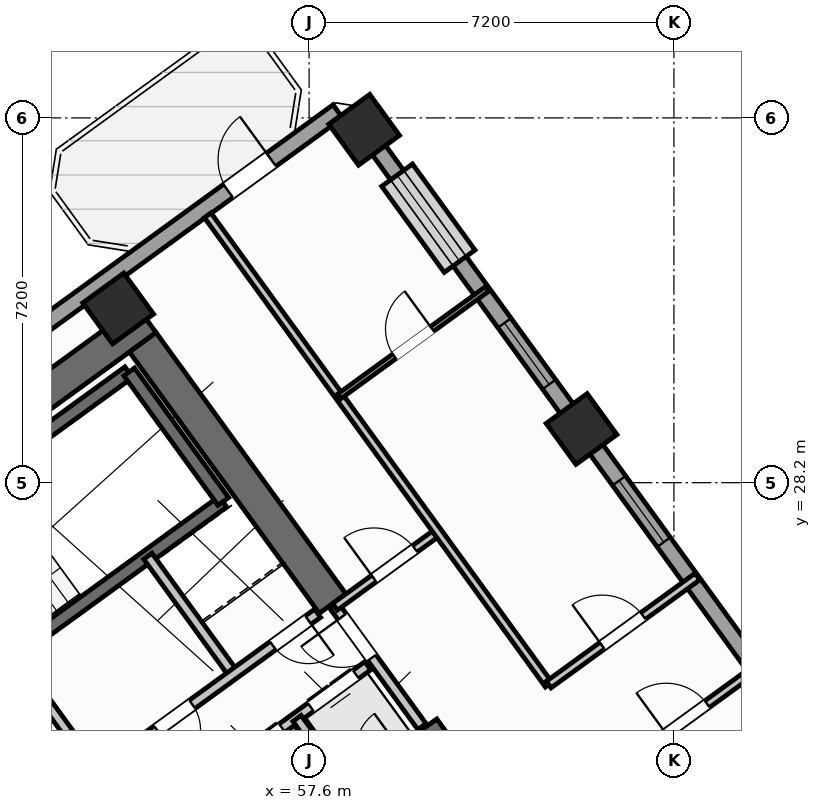
"""IFC4 building model, lengths in metres.
Left out: names, types, materials, properties, quantities, classifications, styles, units other than length and angle.
Written with IfcOpenShell. Run it as: python <this file> out.ifc"""

import sys

from ifc_helpers import new_model, si_unit, direction, frame, frame_2d, origin, origin_2d, place, context, subcontext, project, spatial, rectangle, hollow_rectangle, extrude, source, transform, mapped, element, fill, save


model = new_model("IFC4")
c1 = context("Model", 3, precision=1e-05, world=origin(), true_north=direction((0.0, 1.0)))
c2 = subcontext(c1, "Body", "Model", "MODEL_VIEW")
j1 = project(units=[si_unit("LENGTHUNIT", "METRE"), si_unit("PLANEANGLEUNIT", "RADIAN")], contexts=[c1])
p1 = place(None, origin())
s1 = spatial("IfcSite", under=j1, at=p1, CompositionType="ELEMENT")
p2 = place(p1, origin())
s2 = spatial("IfcBuilding", under=s1, at=p2, CompositionType="ELEMENT")
p3 = place(p2, frame((0.0, 0.0, 52.8)))
s3 = spatial("IfcBuildingStorey", under=s2, at=p3, CompositionType="ELEMENT", Elevation=52.8)
p4 = place(p3, frame((44.325, 24.113, 0.0), z_axis=(0.0, 0.0, 1.0), x_axis=(0.809012664862, 0.58779121131, 0.0)))
e1 = element("IfcWall", 1, at=p4, inside=s3, PredefinedType="SHEAR", context=c2, shape_type="SweptSolid", body=[
    extrude(rectangle(XDim=12.44, YDim=0.65, at=frame_2d((6.22, 0.0))), origin(), (0.0, 0.0, 1.0), 3.35),
])
p5 = place(p3, frame((61.929, 20.494, 0.0), z_axis=(0.0, 0.0, 1.0), x_axis=(-0.58782982593, 0.808984607855, 0.0)))
e2 = element("IfcWall", 2, at=p5, inside=s3, PredefinedType="SHEAR", context=c2, shape_type="SweptSolid", body=[
    extrude(rectangle(XDim=3.525, YDim=0.65, at=frame_2d((1.762, 0.0))), origin(), (0.0, 0.0, 1.0), 3.35),
])
p6 = place(p3, frame((58.064, 25.813, 0.0), z_axis=(0.0, 0.0, 1.0), x_axis=(-0.58777996584, 0.809020835181, 0.0)))
e3 = element("IfcWall", 3, at=p6, inside=s3, PredefinedType="SHEAR", context=c2, shape_type="SweptSolid", body=[
    extrude(rectangle(XDim=6.375, YDim=0.65, at=frame_2d((3.188, 0.0))), origin(), (0.0, 0.0, 1.0), 3.35),
])
m1 = source(origin(), c2, "Body", "SweptSolid", [
    extrude(hollow_rectangle(XDim=1.0, YDim=1.0, WallThickness=0.04, at=origin_2d()), origin(), (0.0, 0.0, 1.0), 3.6),
])
for number, where, z_axis, x_axis in (
    (4, (53.832, 31.638, 0.0), (0.0, 0.0, 1.0), (0.809, 0.588, 0.0)),
    (5, (62.977, 29.259, 0.0), (0.0, 0.0, 1.0), (0.809, 0.588, 0.0)),
    (6, (58.686, 35.165, 0.0), (0.0, 0.0, 1.0), (0.809, 0.588, 0.0)),
):
    element("IfcColumn", number, at=place(p3, frame(where, z_axis=z_axis, x_axis=x_axis)), inside=s3, PredefinedType="COLUMN", context=c2, shape_type="MappedRepresentation", body=[
        mapped(m1, transform((0.0, 0.0, 0.0), scale=1.0)),
    ])
p7 = place(p3, frame((43.938, 25.192, 0.0), z_axis=(0.0, 0.0, 1.0), x_axis=(0.809016324578, 0.587786174187, 0.0)))
e7 = element("IfcWall", 7, at=p7, inside=s3, PredefinedType="STANDARD", context=c2, shape_type="SweptSolid", body=[
    extrude(rectangle(XDim=17.587, YDim=0.32, at=frame_2d((8.794, 0.0))), origin(), (0.0, 0.0, 1.0), 3.35),
])
p8 = place(p7, frame((14.914, 0.0, 0.0)))
e8 = element("IfcOpeningElement", 8, at=p8, cuts=e7, PredefinedType="OPENING", context=c2, shape_type="SweptSolid", body=[
    extrude(rectangle(XDim=1.05, YDim=2.15, at=frame_2d((0.525, 1.075))), frame((0.0, 0.17, 0.0), z_axis=(0.0, -1.0, 0.0), x_axis=(1.0, 0.0, 0.0)), (0.0, 0.0, 1.0), 0.34),
])
p9 = place(p7, frame((2.169, 0.0, 0.8)))
e9 = element("IfcOpeningElement", 9, at=p9, cuts=e7, PredefinedType="OPENING", context=c2, shape_type="SweptSolid", body=[
    extrude(rectangle(XDim=2.1, YDim=1.55, at=frame_2d((1.05, 0.775))), frame((0.0, 0.17, 0.0), z_axis=(0.0, -1.0, 0.0), x_axis=(1.0, 0.0, 0.0)), (0.0, 0.0, 1.0), 0.34),
])
p10 = place(p7, frame((7.319, 0.0, 0.8)))
e10 = element("IfcOpeningElement", 10, at=p10, cuts=e7, PredefinedType="OPENING", context=c2, shape_type="SweptSolid", body=[
    extrude(rectangle(XDim=2.1, YDim=1.55, at=frame_2d((1.05, 0.775))), frame((0.0, 0.17, 0.0), z_axis=(0.0, -1.0, 0.0), x_axis=(1.0, 0.0, 0.0)), (0.0, 0.0, 1.0), 0.34),
])
p11 = place(p3, frame((58.455, 35.484, 0.0), z_axis=(0.0, 0.0, 1.0), x_axis=(0.587783625747, -0.809018176127, 0.0)))
e11 = element("IfcWall", 11, at=p11, inside=s3, PredefinedType="STANDARD", context=c2, shape_type="SweptSolid", body=[
    extrude(rectangle(XDim=21.587, YDim=0.32, at=frame_2d((10.794, 0.0))), origin(), (0.0, 0.0, 1.0), 2.725),
])
p12 = place(p11, frame((1.5, 0.0, 0.8)))
e12 = element("IfcOpeningElement", 12, at=p12, cuts=e11, PredefinedType="OPENING", context=c2, shape_type="SweptSolid", body=[
    extrude(rectangle(XDim=2.1, YDim=1.55, at=frame_2d((1.05, 0.775))), frame((0.0, 0.17, 0.0), z_axis=(0.0, -1.0, 0.0), x_axis=(1.0, 0.0, 0.0)), (0.0, 0.0, 1.0), 0.34),
])
p13 = place(p11, frame((5.105, 0.0, 0.85)))
e13 = element("IfcOpeningElement", 13, at=p13, cuts=e11, PredefinedType="OPENING", context=c2, shape_type="SweptSolid", body=[
    extrude(rectangle(XDim=1.5, YDim=1.5, at=frame_2d((0.75, 0.75))), frame((0.0, 0.17, 0.0), z_axis=(0.0, -1.0, 0.0), x_axis=(1.0, 0.0, 0.0)), (0.0, 0.0, 1.0), 0.34),
])
p14 = place(p11, frame((8.954, 0.0, 0.85)))
e14 = element("IfcOpeningElement", 14, at=p14, cuts=e11, PredefinedType="OPENING", context=c2, shape_type="SweptSolid", body=[
    extrude(rectangle(XDim=1.5, YDim=1.5, at=frame_2d((0.75, 0.75))), frame((0.0, 0.17, 0.0), z_axis=(0.0, -1.0, 0.0), x_axis=(1.0, 0.0, 0.0)), (0.0, 0.0, 1.0), 0.34),
])
p15 = place(p11, frame((17.581, 0.0, 0.95)))
e15 = element("IfcOpeningElement", 15, at=p15, cuts=e11, PredefinedType="OPENING", context=c2, shape_type="SweptSolid", body=[
    extrude(rectangle(XDim=1.2, YDim=1.4, at=frame_2d((0.6, 0.7))), frame((0.0, 0.17, 0.0), z_axis=(0.0, -1.0, 0.0), x_axis=(1.0, 0.0, 0.0)), (0.0, 0.0, 1.0), 0.34),
])
p16 = place(p3, frame((48.006, 25.996, 0.0), z_axis=(0.0, 0.0, 1.0), x_axis=(0.80901903764, 0.587782439969, 0.0)))
e16 = element("IfcWall", 16, at=p16, inside=s3, PredefinedType="SHEAR", context=c2, shape_type="SweptSolid", body=[
    extrude(rectangle(XDim=7.46, YDim=0.26, at=frame_2d((3.73, 0.0))), origin(), (0.0, 0.0, 1.0), 3.35),
])
p17 = place(p3, frame((49.863, 23.44, 0.0), z_axis=(0.0, 0.0, 1.0), x_axis=(0.809003474932, 0.587803859759, 0.0)))
e17 = element("IfcWall", 17, at=p17, inside=s3, PredefinedType="SHEAR", context=c2, shape_type="SweptSolid", body=[
    extrude(rectangle(XDim=7.46, YDim=0.26, at=frame_2d((3.73, 0.0))), origin(), (0.0, 0.0, 1.0), 3.35),
])
p18 = place(p17, frame((0.36, 0.0, 0.0)))
e18 = element("IfcOpeningElement", 18, at=p18, cuts=e17, PredefinedType="OPENING", context=c2, shape_type="SweptSolid", body=[
    extrude(rectangle(XDim=0.86, YDim=2.05, at=frame_2d((0.43, 1.025))), frame((0.0, 0.14, 0.0), z_axis=(0.0, -1.0, 0.0), x_axis=(1.0, 0.0, 0.0)), (0.0, 0.0, 1.0), 0.28),
])
p19 = place(p3, frame((55.906, 27.831, 0.0), z_axis=(0.0, 0.0, 1.0), x_axis=(-0.587804123638, 0.809003283204, 0.0)))
e19 = element("IfcWall", 19, at=p19, inside=s3, PredefinedType="SHEAR", context=c2, shape_type="SweptSolid", body=[
    extrude(rectangle(XDim=3.16, YDim=0.26, at=frame_2d((1.58, 0.0))), origin(), (0.0, 0.0, 1.0), 3.35),
])
p20 = place(p3, frame((54.421, 21.436, 0.0), z_axis=(0.0, 0.0, 1.0), x_axis=(0.809013710463, 0.587789772183, 0.0)))
e20 = element("IfcWall", 20, at=p20, inside=s3, PredefinedType="STANDARD", context=c2, shape_type="SweptSolid", body=[
    extrude(rectangle(XDim=5.36, YDim=0.2, at=frame_2d((2.68, 0.0))), origin(), (0.0, 0.0, 1.0), 3.34),
])
p21 = place(p20, frame((0.37, 0.0, 0.0)))
e21 = element("IfcOpeningElement", 21, at=p21, cuts=e20, PredefinedType="OPENING", context=c2, shape_type="SweptSolid", body=[
    extrude(rectangle(XDim=1.1, YDim=2.15, at=frame_2d((0.55, 1.075))), frame((0.0, 0.11, 0.0), z_axis=(0.0, -1.0, 0.0), x_axis=(1.0, 0.0, 0.0)), (0.0, 0.0, 1.0), 0.22),
])
p22 = place(p20, frame((2.17, 0.0, 0.0)))
e22 = element("IfcOpeningElement", 22, at=p22, cuts=e20, PredefinedType="OPENING", context=c2, shape_type="SweptSolid", body=[
    extrude(rectangle(XDim=1.1, YDim=2.15, at=frame_2d((0.55, 1.075))), frame((0.0, 0.11, 0.0), z_axis=(0.0, -1.0, 0.0), x_axis=(1.0, 0.0, 0.0)), (0.0, 0.0, 1.0), 0.22),
])
p23 = place(p20, frame((3.97, 0.0, 0.0)))
e23 = element("IfcOpeningElement", 23, at=p23, cuts=e20, PredefinedType="OPENING", context=c2, shape_type="SweptSolid", body=[
    extrude(rectangle(XDim=1.1, YDim=2.15, at=frame_2d((0.55, 1.075))), frame((0.0, 0.11, 0.0), z_axis=(0.0, -1.0, 0.0), x_axis=(1.0, 0.0, 0.0)), (0.0, 0.0, 1.0), 0.22),
])
p24 = place(p3, frame((58.29, 22.27, 0.0), z_axis=(0.0, 0.0, 1.0), x_axis=(-0.587840865826, 0.808976585857, 0.0)))
e24 = element("IfcWall", 24, at=p24, inside=s3, PredefinedType="STANDARD", context=c2, shape_type="SweptSolid", body=[
    extrude(rectangle(XDim=1.58, YDim=0.2, at=frame_2d((0.79, 0.0))), origin(), (0.0, 0.0, 1.0), 3.34),
])
p25 = place(p3, frame((53.425, 22.468, 0.0), z_axis=(0.0, 0.0, 1.0), x_axis=(-0.5877230039, 0.809062216821, 0.0)))
e25 = element("IfcWall", 25, at=p25, inside=s3, PredefinedType="STANDARD", context=c2, shape_type="SweptSolid", body=[
    extrude(rectangle(XDim=2.88, YDim=0.2, at=frame_2d((1.44, 0.0))), origin(), (0.0, 0.0, 1.0), 3.34),
])
p26 = place(p3, frame((56.111, 24.419, 0.0), z_axis=(0.0, 0.0, 1.0), x_axis=(-0.58777848983, 0.809021907548, 0.0)))
e26 = element("IfcWall", 26, at=p26, inside=s3, PredefinedType="STANDARD", context=c2, shape_type="SweptSolid", body=[
    extrude(rectangle(XDim=2.88, YDim=0.2, at=frame_2d((1.44, 0.0))), origin(), (0.0, 0.0, 1.0), 3.34),
])
p27 = place(p3, frame((53.425, 22.468, 0.0), z_axis=(0.0, 0.0, 1.0), x_axis=(0.80902705128, 0.587771409902, 0.0)))
e27 = element("IfcWall", 27, at=p27, inside=s3, PredefinedType="STANDARD", context=c2, shape_type="SweptSolid", body=[
    extrude(rectangle(XDim=5.368, YDim=0.2, at=frame_2d((2.684, 0.0))), origin(), (0.0, 0.0, 1.0), 3.34),
])
p28 = place(p27, frame((4.28, 0.0, 0.0)))
e28 = element("IfcOpeningElement", 28, at=p28, cuts=e27, PredefinedType="OPENING", context=c2, shape_type="SweptSolid", body=[
    extrude(rectangle(XDim=0.86, YDim=2.05, at=frame_2d((0.43, 1.025))), frame((0.0, 0.11, 0.0), z_axis=(0.0, -1.0, 0.0), x_axis=(1.0, 0.0, 0.0)), (0.0, 0.0, 1.0), 0.22),
])
p29 = place(p27, frame((1.45, 0.0, 0.0)))
e29 = element("IfcOpeningElement", 29, at=p29, cuts=e27, PredefinedType="OPENING", context=c2, shape_type="SweptSolid", body=[
    extrude(rectangle(XDim=0.86, YDim=2.05, at=frame_2d((0.43, 1.025))), frame((0.0, 0.11, 0.0), z_axis=(0.0, -1.0, 0.0), x_axis=(1.0, 0.0, 0.0)), (0.0, 0.0, 1.0), 0.22),
])
p30 = place(p3, frame((59.827, 23.386, 0.0), z_axis=(0.0, 0.0, 1.0), x_axis=(-0.587803840107, 0.809003489211, 0.0)))
e30 = element("IfcWall", 30, at=p30, inside=s3, PredefinedType="STANDARD", context=c2, shape_type="SweptSolid", body=[
    extrude(rectangle(XDim=2.96, YDim=0.2, at=frame_2d((1.48, 0.0))), origin(), (0.0, 0.0, 1.0), 3.34),
])
p31 = place(p30, frame((1.68, 0.0, 0.0)))
e31 = element("IfcOpeningElement", 31, at=p31, cuts=e30, PredefinedType="OPENING", context=c2, shape_type="SweptSolid", body=[
    extrude(rectangle(XDim=1.0, YDim=2.1, at=frame_2d((0.5, 1.05))), frame((0.0, 0.11, 0.0), z_axis=(0.0, -1.0, 0.0), x_axis=(1.0, 0.0, 0.0)), (0.0, 0.0, 1.0), 0.22),
])
p32 = place(p3, frame((58.111, 25.749, 0.0), z_axis=(0.0, 0.0, 1.0), x_axis=(0.809000999347, 0.58780726693, 0.0)))
e32 = element("IfcWall", 32, at=p32, inside=s3, PredefinedType="PARTITIONING", context=c2, shape_type="SweptSolid", body=[
    extrude(rectangle(XDim=2.51, YDim=0.16, at=frame_2d((1.255, 0.0))), origin(), (0.0, 0.0, 1.0), 2.725),
])
p33 = place(p32, frame((0.95, 0.0, 0.0)))
e33 = element("IfcOpeningElement", 33, at=p33, cuts=e32, PredefinedType="OPENING", context=c2, shape_type="SweptSolid", body=[
    extrude(rectangle(XDim=1.0, YDim=2.1, at=frame_2d((0.5, 1.05))), frame((0.0, 0.09, 0.0), z_axis=(0.0, -1.0, 0.0), x_axis=(1.0, 0.0, 0.0)), (0.0, 0.0, 1.0), 0.18),
])
p34 = place(p3, frame((62.328, 24.215, 0.0), z_axis=(0.0, 0.0, 1.0), x_axis=(-0.587778600963, 0.809021826807, 0.0)))
e34 = element("IfcWall", 34, at=p34, inside=s3, PredefinedType="PARTITIONING", context=c2, shape_type="SweptSolid", body=[
    extrude(rectangle(XDim=11.45, YDim=0.16, at=frame_2d((5.725, 0.0))), origin(), (0.0, 0.0, 1.0), 3.34),
])
p35 = place(p3, frame((63.592, 22.475, 0.0), z_axis=(0.0, 0.0, 1.0), x_axis=(0.809035546126, 0.58775971715, 0.0)))
e35 = element("IfcWall", 35, at=p35, inside=s3, PredefinedType="PARTITIONING", context=c2, shape_type="SweptSolid", body=[
    extrude(rectangle(XDim=3.63, YDim=0.16, at=frame_2d((1.815, 0.0))), origin(), (0.0, 0.0, 1.0), 3.34),
])
p36 = place(p35, frame((1.305, 0.0, 0.0)))
e36 = element("IfcOpeningElement", 36, at=p36, cuts=e35, PredefinedType="OPENING", context=c2, shape_type="SweptSolid", body=[
    extrude(rectangle(XDim=1.0, YDim=2.1, at=frame_2d((0.5, 1.05))), frame((0.0, 0.09, 0.0), z_axis=(0.0, -1.0, 0.0), x_axis=(1.0, 0.0, 0.0)), (0.0, 0.0, 1.0), 0.18),
])
p37 = place(p3, frame((62.328, 24.215, 0.0), z_axis=(0.0, 0.0, 1.0), x_axis=(0.809003564202, 0.587803736896, 0.0)))
e37 = element("IfcWall", 37, at=p37, inside=s3, PredefinedType="PARTITIONING", context=c2, shape_type="SweptSolid", body=[
    extrude(rectangle(XDim=3.63, YDim=0.16, at=frame_2d((1.815, 0.0))), origin(), (0.0, 0.0, 1.0), 3.34),
])
p38 = place(p37, frame((1.305, 0.0, 0.0)))
e38 = element("IfcOpeningElement", 38, at=p38, cuts=e37, PredefinedType="OPENING", context=c2, shape_type="SweptSolid", body=[
    extrude(rectangle(XDim=1.0, YDim=2.1, at=frame_2d((0.5, 1.05))), frame((0.0, 0.09, 0.0), z_axis=(0.0, -1.0, 0.0), x_axis=(1.0, 0.0, 0.0)), (0.0, 0.0, 1.0), 0.18),
])
p39 = place(p3, frame((58.195, 29.904, 0.0), z_axis=(0.0, 0.0, 1.0), x_axis=(0.809005039917, 0.58780170584, 0.0)))
e39 = element("IfcWall", 39, at=p39, inside=s3, PredefinedType="PARTITIONING", context=c2, shape_type="SweptSolid", body=[
    extrude(rectangle(XDim=3.61, YDim=0.11, at=frame_2d((1.805, 0.0))), origin(), (0.0, 0.0, 1.0), 3.34),
])
p40 = place(p39, frame((1.345, 0.0, 0.0)))
e40 = element("IfcOpeningElement", 40, at=p40, cuts=e39, PredefinedType="OPENING", context=c2, shape_type="SweptSolid", body=[
    extrude(rectangle(XDim=0.92, YDim=2.08, at=frame_2d((0.46, 1.04))), frame((0.0, 0.065, 0.0), z_axis=(0.0, -1.0, 0.0), x_axis=(1.0, 0.0, 0.0)), (0.0, 0.0, 1.0), 0.13),
])
m2 = source(origin(), c2, "Body", "SweptSolid", [
    extrude(rectangle(XDim=1.05, YDim=2.15, at=frame_2d((0.525, 1.075))), frame((0.0, 0.025, 0.0), z_axis=(0.0, -1.0, 0.0), x_axis=(1.0, 0.0, 0.0)), (0.0, 0.0, 1.0), 0.05),
])
p41 = place(p8, origin())
e41 = element("IfcDoor", 41, at=p41, inside=s3, OperationType="SINGLE_SWING_RIGHT", PredefinedType="DOOR", context=c2, shape_type="MappedRepresentation", body=[
    mapped(m2, transform((0.0, 0.0, 0.0), scale=1.0)),
])
fill(e8, e41)
m3 = source(origin(), c2, "Body", "SweptSolid", [
    extrude(rectangle(XDim=2.1, YDim=1.55, at=frame_2d((1.05, 0.775))), frame((0.0, 0.03, 0.0), z_axis=(0.0, -1.0, 0.0), x_axis=(1.0, 0.0, 0.0)), (0.0, 0.0, 1.0), 0.06),
])
p42 = place(p12, origin())
e42 = element("IfcWindow", 42, at=p42, inside=s3, PartitioningType="SINGLE_PANEL", PredefinedType="WINDOW", context=c2, shape_type="MappedRepresentation", body=[
    mapped(m3, transform((0.0, 0.0, 0.0), scale=1.0)),
])
fill(e12, e42)
m4 = source(origin(), c2, "Body", "SweptSolid", [
    extrude(rectangle(XDim=1.5, YDim=1.5, at=frame_2d((0.75, 0.75))), frame((0.0, 0.03, 0.0), z_axis=(0.0, -1.0, 0.0), x_axis=(1.0, 0.0, 0.0)), (0.0, 0.0, 1.0), 0.06),
])
p43 = place(p13, origin())
e43 = element("IfcWindow", 43, at=p43, inside=s3, PartitioningType="SINGLE_PANEL", PredefinedType="WINDOW", context=c2, shape_type="MappedRepresentation", body=[
    mapped(m4, transform((0.0, 0.0, 0.0), scale=1.0)),
])
fill(e13, e43)
p44 = place(p14, origin())
e44 = element("IfcWindow", 44, at=p44, inside=s3, PartitioningType="SINGLE_PANEL", PredefinedType="WINDOW", context=c2, shape_type="MappedRepresentation", body=[
    mapped(m4, transform((0.0, 0.0, 0.0), scale=1.0)),
])
fill(e14, e44)
m5 = source(origin(), c2, "Body", "SweptSolid", [
    extrude(rectangle(XDim=1.1, YDim=2.15, at=frame_2d((0.55, 1.075))), frame((0.0, 0.025, 0.0), z_axis=(0.0, -1.0, 0.0), x_axis=(1.0, 0.0, 0.0)), (0.0, 0.0, 1.0), 0.05),
])
p45 = place(p22, origin())
e45 = element("IfcDoor", 45, at=p45, inside=s3, OperationType="DOUBLE_DOOR_SLIDING", PredefinedType="DOOR", context=c2, shape_type="MappedRepresentation", body=[
    mapped(m5, transform((0.0, 0.0, 0.0), scale=1.0)),
])
fill(e22, e45)
p46 = place(p23, origin())
e46 = element("IfcDoor", 46, at=p46, inside=s3, OperationType="DOUBLE_DOOR_SLIDING", PredefinedType="DOOR", context=c2, shape_type="MappedRepresentation", body=[
    mapped(m5, transform((0.0, 0.0, 0.0), scale=1.0)),
])
fill(e23, e46)
m6 = source(origin(), c2, "Body", "SweptSolid", [
    extrude(rectangle(XDim=0.86, YDim=2.05, at=frame_2d((0.43, 1.025))), frame((0.0, 0.025, 0.0), z_axis=(0.0, -1.0, 0.0), x_axis=(1.0, 0.0, 0.0)), (0.0, 0.0, 1.0), 0.05),
])
p47 = place(p28, frame((0.86, 0.0, 0.0), z_axis=(0.0, 0.0, 1.0), x_axis=(-1.0, 0.0, 0.0)))
e47 = element("IfcDoor", 47, at=p47, inside=s3, OperationType="SINGLE_SWING_LEFT", PredefinedType="DOOR", context=c2, shape_type="MappedRepresentation", body=[
    mapped(m6, transform((0.0, 0.0, 0.0), scale=1.0)),
])
fill(e28, e47)
p48 = place(p29, frame((0.86, 0.0, 0.0), z_axis=(0.0, 0.0, 1.0), x_axis=(-1.0, 0.0, 0.0)))
e48 = element("IfcDoor", 48, at=p48, inside=s3, OperationType="SINGLE_SWING_RIGHT", PredefinedType="DOOR", context=c2, shape_type="MappedRepresentation", body=[
    mapped(m6, transform((0.0, 0.0, 0.0), scale=1.0)),
])
fill(e29, e48)
m7 = source(origin(), c2, "Body", "SweptSolid", [
    extrude(rectangle(XDim=1.0, YDim=2.1, at=frame_2d((0.5, 1.05))), frame((0.0, 0.025, 0.0), z_axis=(0.0, -1.0, 0.0), x_axis=(1.0, 0.0, 0.0)), (0.0, 0.0, 1.0), 0.05),
])
p49 = place(p33, origin())
e49 = element("IfcDoor", 49, at=p49, inside=s3, OperationType="SINGLE_SWING_LEFT", PredefinedType="DOOR", context=c2, shape_type="MappedRepresentation", body=[
    mapped(m7, transform((0.0, 0.0, 0.0), scale=1.0)),
])
fill(e33, e49)
p50 = place(p31, origin())
e50 = element("IfcDoor", 50, at=p50, inside=s3, OperationType="SINGLE_SWING_RIGHT", PredefinedType="DOOR", context=c2, shape_type="MappedRepresentation", body=[
    mapped(m7, transform((0.0, 0.0, 0.0), scale=1.0)),
])
fill(e31, e50)
p51 = place(p38, origin())
e51 = element("IfcDoor", 51, at=p51, inside=s3, OperationType="SINGLE_SWING_LEFT", PredefinedType="DOOR", context=c2, shape_type="MappedRepresentation", body=[
    mapped(m7, transform((0.0, 0.0, 0.0), scale=1.0)),
])
fill(e38, e51)
m8 = source(origin(), c2, "Body", "SweptSolid", [
    extrude(rectangle(XDim=0.92, YDim=2.08, at=frame_2d((0.46, 1.04))), frame((0.0, 0.025, 0.0), z_axis=(0.0, -1.0, 0.0), x_axis=(1.0, 0.0, 0.0)), (0.0, 0.0, 1.0), 0.05),
])
p52 = place(p40, origin())
e52 = element("IfcDoor", 52, at=p52, inside=s3, OperationType="SINGLE_SWING_RIGHT", PredefinedType="DOOR", context=c2, shape_type="MappedRepresentation", body=[
    mapped(m8, transform((0.0, 0.0, 0.0), scale=1.0)),
])
fill(e40, e52)
p53 = place(p36, origin())
e53 = element("IfcDoor", 53, at=p53, inside=s3, OperationType="SINGLE_SWING_LEFT", PredefinedType="DOOR", context=c2, shape_type="MappedRepresentation", body=[
    mapped(m7, transform((0.0, 0.0, 0.0), scale=1.0)),
])
fill(e36, e53)
save(model, sys.argv[1])
